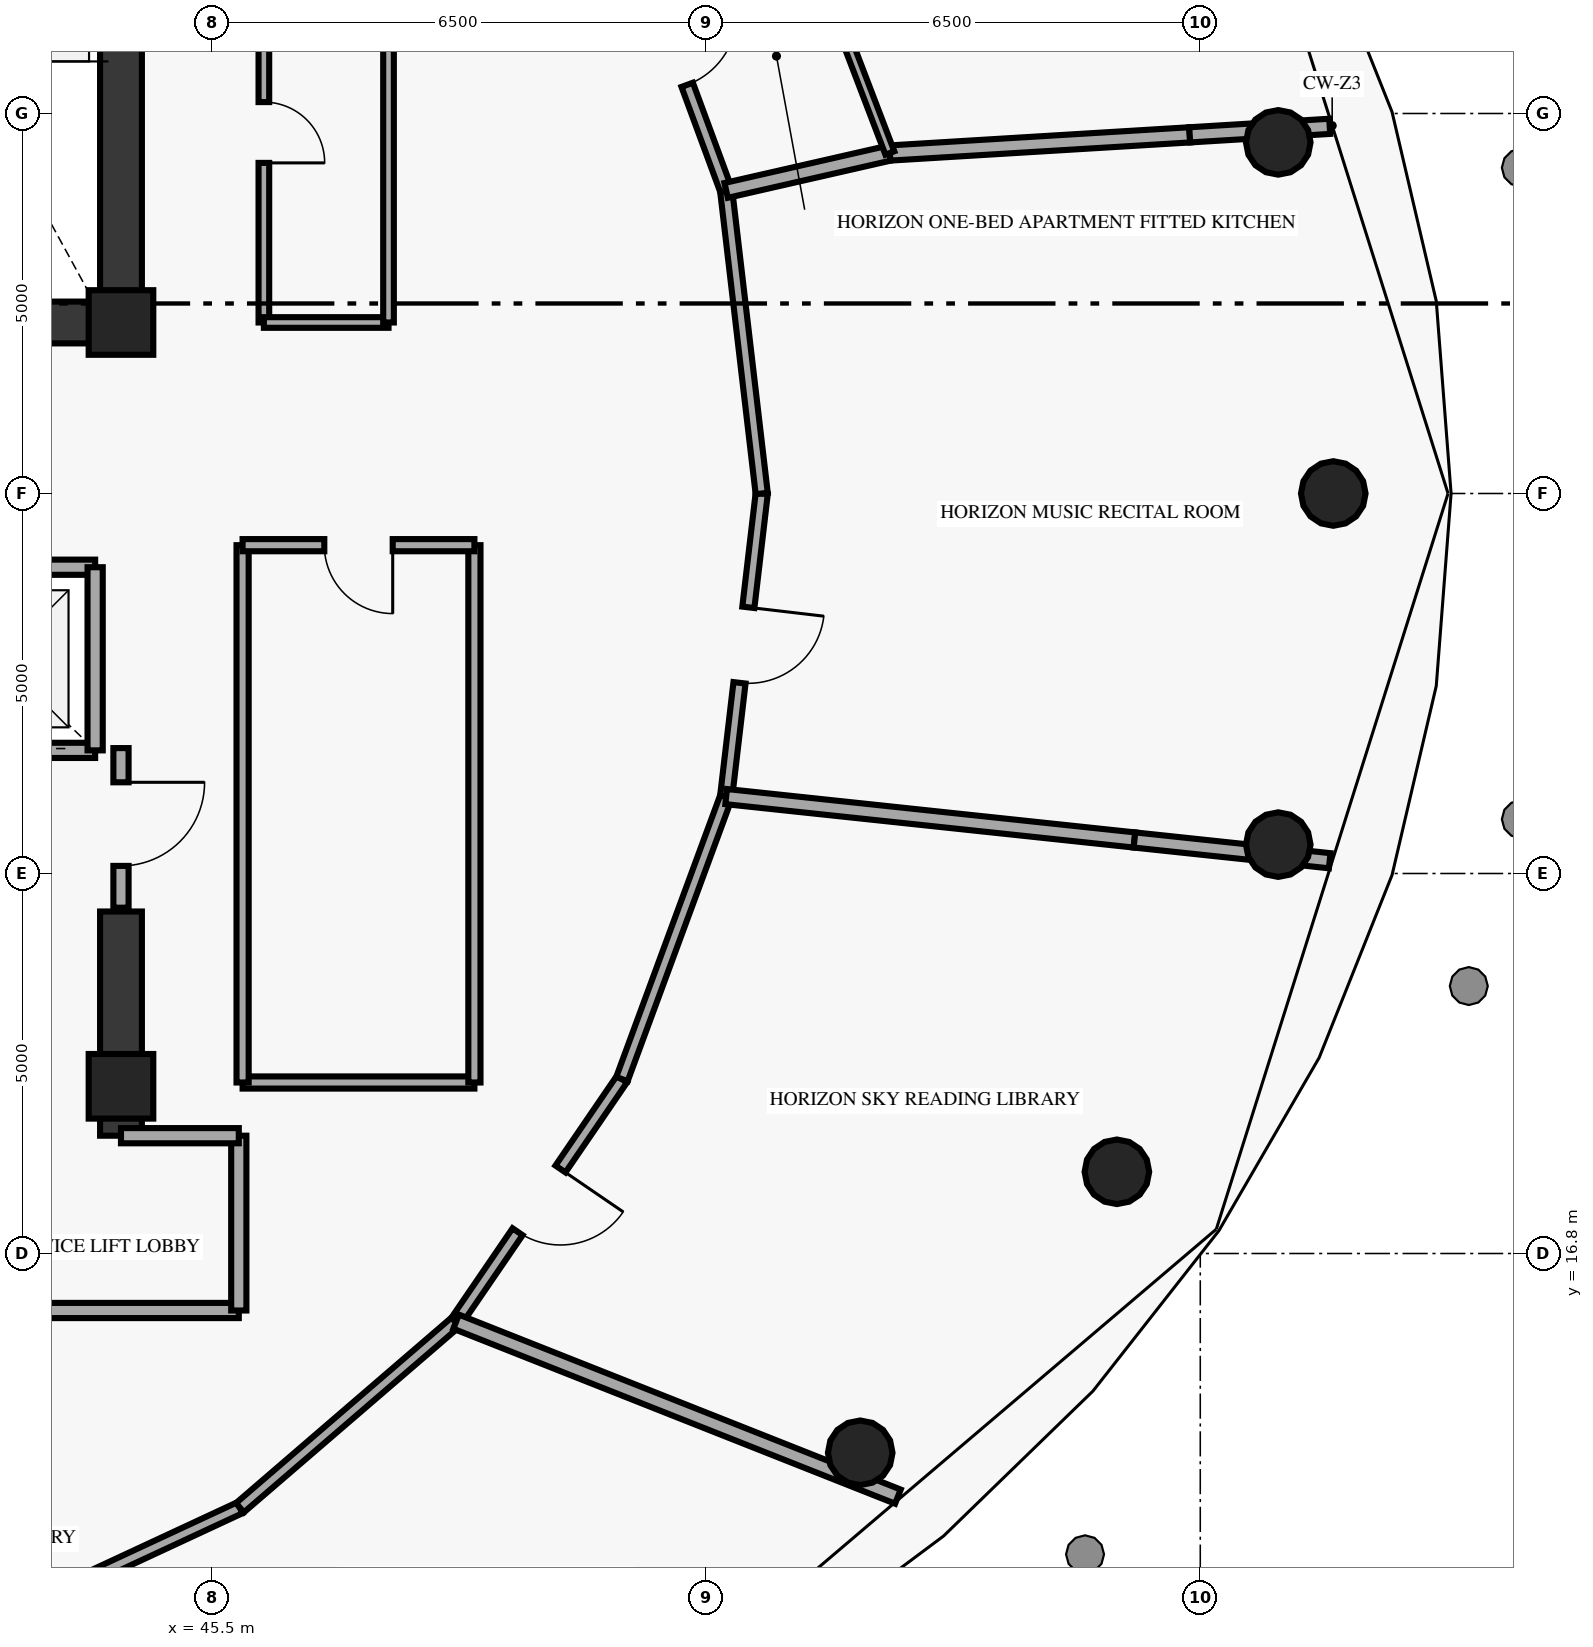
"""IFC4 building model, lengths in metres.
Left out: names, types, materials, properties, quantities, classifications, styles, units other than length and angle.
Written with IfcOpenShell. Run it as: python <this file> out.ifc"""

import sys

from ifc_helpers import new_model, si_unit, direction, frame, frame_2d, origin, origin_2d, place, context, subcontext, project, spatial, rectangle, circle, extrude, element, fill, save


model = new_model("IFC4")
c1 = context("Model", 3, precision=1e-05, world=origin(), true_north=direction((0.0, 1.0)))
c2 = subcontext(c1, "Body", "Model", "MODEL_VIEW")
j1 = project(units=[si_unit("LENGTHUNIT", "METRE"), si_unit("PLANEANGLEUNIT", "RADIAN")], contexts=[c1])
p1 = place(None, origin())
s1 = spatial("IfcSite", under=j1, at=p1, CompositionType="ELEMENT")
p2 = place(p1, origin())
s2 = spatial("IfcBuilding", under=s1, at=p2, CompositionType="ELEMENT")
p3 = place(p2, frame((0.0, 0.0, 251.95)))
s3 = spatial("IfcBuildingStorey", under=s2, at=p3, CompositionType="ELEMENT", Elevation=251.95)
for number, where, z_axis, x_axis in (
    (1, (44.3, 19.0, 0.0), (0.0, 0.0, 1.0), (1.0, 0.0, 0.0)),
    (2, (44.3, 29.05, 0.0), (0.0, 0.0, 1.0), (1.0, 0.0, 0.0)),
):
    element("IfcColumn", number, at=place(p3, frame(where, z_axis=z_axis, x_axis=x_axis)), inside=s3, PredefinedType="PILASTER", context=c2, shape_type="SweptSolid", body=[
        extrude(rectangle(XDim=0.85, YDim=0.85, at=origin_2d()), origin(), (0.0, 0.0, 1.0), 3.39),
    ])
for number, where, z_axis, x_axis in (
    (3, (60.25, 26.8, 0.0), (0.0, 0.0, 1.0), (1.0, 0.0, 0.0)),
    (4, (59.526, 31.42, 0.0), (0.0, 0.0, 1.0), (1.0, 0.0, 0.0)),
    (5, (54.026, 14.178, 0.0), (0.0, 0.0, 1.0), (1.0, 0.0, 0.0)),
    (6, (57.403, 17.875, 0.0), (0.0, 0.0, 1.0), (1.0, 0.0, 0.0)),
    (7, (59.526, 22.18, 0.0), (0.0, 0.0, 1.0), (1.0, 0.0, 0.0)),
):
    element("IfcColumn", number, at=place(p3, frame(where, z_axis=z_axis, x_axis=x_axis)), inside=s3, PredefinedType="COLUMN", context=c2, shape_type="SweptSolid", body=[
        extrude(circle(Radius=0.425, at=origin_2d()), origin(), (0.0, 0.0, 1.0), 3.39),
    ])
p4 = place(p3, frame((44.3, 29.05, 0.0), z_axis=(0.0, 0.0, 1.0), x_axis=(0.0, 1.0, 0.0)))
e8 = element("IfcWall", 8, at=p4, inside=s3, PredefinedType="SHEAR", context=c2, shape_type="SweptSolid", body=[
    extrude(rectangle(XDim=8.35, YDim=0.55, at=frame_2d((4.175, 0.0))), origin(), (0.0, 0.0, 1.0), 3.39),
])
p5 = place(p3, frame((44.3, 18.35, 0.0), z_axis=(0.0, 0.0, 1.0), x_axis=(0.0, 1.0, 0.0)))
e9 = element("IfcWall", 9, at=p5, inside=s3, PredefinedType="SHEAR", context=c2, shape_type="SweptSolid", body=[
    extrude(rectangle(XDim=2.95, YDim=0.55, at=frame_2d((1.475, 0.0))), origin(), (0.0, 0.0, 1.0), 3.39),
])
p6 = place(p3, frame((33.7, 29.05, 0.0), z_axis=(0.0, 0.0, 1.0), x_axis=(1.0, 0.0, 0.0)))
e10 = element("IfcWall", 10, at=p6, inside=s3, PredefinedType="SHEAR", context=c2, shape_type="SweptSolid", body=[
    extrude(rectangle(XDim=10.6, YDim=0.55, at=frame_2d((5.3, 0.0))), origin(), (0.0, 0.0, 1.0), 3.39),
])
p7 = place(p3, frame((41.46, 23.42, 0.0), z_axis=(0.0, 0.0, 1.0), x_axis=(1.0, 0.0, 0.0)))
e11 = element("IfcWall", 11, at=p7, inside=s3, PredefinedType="SOLIDWALL", context=c2, shape_type="SweptSolid", body=[
    extrude(rectangle(XDim=2.5, YDim=0.2, at=frame_2d((1.25, 0.0))), origin(), (0.0, 0.0, 1.0), 3.39),
])
p8 = place(p7, frame((0.7, 0.0, 0.0)))
e12 = element("IfcOpeningElement", 12, at=p8, cuts=e11, PredefinedType="OPENING", context=c2, shape_type="SweptSolid", body=[
    extrude(rectangle(XDim=1.1, YDim=2.15, at=frame_2d((0.55, 1.075))), frame((0.0, 0.11, 0.0), z_axis=(0.0, -1.0, 0.0), x_axis=(1.0, 0.0, 0.0)), (0.0, 0.0, 1.0), 0.22),
])
p9 = place(p3, frame((41.46, 25.83, 0.0), z_axis=(0.0, 0.0, 1.0), x_axis=(1.0, 0.0, 0.0)))
e13 = element("IfcWall", 13, at=p9, inside=s3, PredefinedType="SOLIDWALL", context=c2, shape_type="SweptSolid", body=[
    extrude(rectangle(XDim=2.5, YDim=0.2, at=frame_2d((1.25, 0.0))), origin(), (0.0, 0.0, 1.0), 3.39),
])
p10 = place(p3, frame((43.96, 23.42, 0.0), z_axis=(0.0, 0.0, 1.0), x_axis=(0.0, 1.0, 0.0)))
e14 = element("IfcWall", 14, at=p10, inside=s3, PredefinedType="SOLIDWALL", context=c2, shape_type="SweptSolid", body=[
    extrude(rectangle(XDim=2.41, YDim=0.2, at=frame_2d((1.205, 0.0))), origin(), (0.0, 0.0, 1.0), 3.39),
])
p11 = place(p3, frame((45.9, 19.05, 0.0), z_axis=(0.0, 0.0, 1.0), x_axis=(1.0, 0.0, 0.0)))
e15 = element("IfcWall", 15, at=p11, inside=s3, PredefinedType="PARTITIONING", context=c2, shape_type="SweptSolid", body=[
    extrude(rectangle(XDim=3.05, YDim=0.16, at=frame_2d((1.525, 0.0))), origin(), (0.0, 0.0, 1.0), 3.39),
])
for number, where, z_axis, x_axis in (
    (16, (48.95, 19.05, 0.0), (0.0, 0.0, 1.0), (0.0, 1.0, 0.0)),
    (17, (45.9, 19.05, 0.0), (0.0, 0.0, 1.0), (0.0, 1.0, 0.0)),
):
    element("IfcWall", number, at=place(p3, frame(where, z_axis=z_axis, x_axis=x_axis)), inside=s3, PredefinedType="PARTITIONING", context=c2, shape_type="SweptSolid", body=[
        extrude(rectangle(XDim=7.07, YDim=0.16, at=frame_2d((3.535, 0.0))), origin(), (0.0, 0.0, 1.0), 3.39),
    ])
p12 = place(p3, frame((48.95, 26.12, 0.0), z_axis=(0.0, 0.0, 1.0), x_axis=(-1.0, 0.0, 0.0)))
e18 = element("IfcWall", 18, at=p12, inside=s3, PredefinedType="PARTITIONING", context=c2, shape_type="SweptSolid", body=[
    extrude(rectangle(XDim=3.05, YDim=0.16, at=frame_2d((1.525, 0.0))), origin(), (0.0, 0.0, 1.0), 3.39),
])
p13 = place(p12, frame((1.075, 0.0, 0.0)))
e19 = element("IfcOpeningElement", 19, at=p13, cuts=e18, PredefinedType="OPENING", context=c2, shape_type="SweptSolid", body=[
    extrude(rectangle(XDim=0.9, YDim=2.02, at=frame_2d((0.45, 1.01))), frame((0.0, 0.09, 0.0), z_axis=(0.0, -1.0, 0.0), x_axis=(1.0, 0.0, 0.0)), (0.0, 0.0, 1.0), 0.18),
])
p14 = place(p3, frame((44.3, 21.35, 0.0), z_axis=(0.0, 0.0, 1.0), x_axis=(0.0, 1.0, 0.0)))
e20 = element("IfcWall", 20, at=p14, inside=s3, PredefinedType="SOLIDWALL", context=c2, shape_type="SweptSolid", body=[
    extrude(rectangle(XDim=2.1, YDim=0.2, at=frame_2d((1.05, 0.0))), origin(), (0.0, 0.0, 1.0), 2.775),
])
p15 = place(p14, frame((0.55, 0.0, 0.0)))
e21 = element("IfcOpeningElement", 21, at=p15, cuts=e20, PredefinedType="OPENING", context=c2, shape_type="SweptSolid", body=[
    extrude(rectangle(XDim=1.1, YDim=2.15, at=frame_2d((0.55, 1.075))), frame((0.0, 0.11, 0.0), z_axis=(0.0, -1.0, 0.0), x_axis=(1.0, 0.0, 0.0)), (0.0, 0.0, 1.0), 0.22),
])
p16 = place(p3, frame((41.35, 16.05, 0.0), z_axis=(0.0, 0.0, 1.0), x_axis=(1.0, 0.0, 0.0)))
e22 = element("IfcWall", 22, at=p16, inside=s3, PredefinedType="SOLIDWALL", context=c2, shape_type="SweptSolid", body=[
    extrude(rectangle(XDim=4.5, YDim=0.2, at=frame_2d((2.25, 0.0))), origin(), (0.0, 0.0, 1.0), 3.39),
])
p17 = place(p3, frame((45.85, 16.05, 0.0), z_axis=(0.0, 0.0, 1.0), x_axis=(0.0, 1.0, 0.0)))
e23 = element("IfcWall", 23, at=p17, inside=s3, PredefinedType="SOLIDWALL", context=c2, shape_type="SweptSolid", body=[
    extrude(rectangle(XDim=2.3, YDim=0.2, at=frame_2d((1.15, 0.0))), origin(), (0.0, 0.0, 1.0), 3.39),
])
p18 = place(p3, frame((44.3, 18.35, 0.0), z_axis=(0.0, 0.0, 1.0), x_axis=(1.0, 0.0, 0.0)))
e24 = element("IfcWall", 24, at=p18, inside=s3, PredefinedType="SOLIDWALL", context=c2, shape_type="SweptSolid", body=[
    extrude(rectangle(XDim=1.55, YDim=0.2, at=frame_2d((0.775, 0.0))), origin(), (0.0, 0.0, 1.0), 3.39),
])
p19 = place(p3, frame((46.18, 34.05, 0.0), z_axis=(0.0, 0.0, 1.0), x_axis=(0.0, -1.0, 0.0)))
e25 = element("IfcWall", 25, at=p19, inside=s3, PredefinedType="PARTITIONING", context=c2, shape_type="SweptSolid", body=[
    extrude(rectangle(XDim=5.0, YDim=0.14, at=frame_2d((2.5, 0.0))), origin(), (0.0, 0.0, 1.0), 3.39),
])
p20 = place(p19, frame((2.1, 0.0, 0.0)))
e26 = element("IfcOpeningElement", 26, at=p20, cuts=e25, PredefinedType="OPENING", context=c2, shape_type="SweptSolid", body=[
    extrude(rectangle(XDim=0.8, YDim=2.05, at=frame_2d((0.4, 1.025))), frame((0.0, 0.08, 0.0), z_axis=(0.0, -1.0, 0.0), x_axis=(1.0, 0.0, 0.0)), (0.0, 0.0, 1.0), 0.16),
])
p21 = place(p3, frame((46.18, 29.05, 0.0), z_axis=(0.0, 0.0, 1.0), x_axis=(1.0, 0.0, 0.0)))
e27 = element("IfcWall", 27, at=p21, inside=s3, PredefinedType="PARTITIONING", context=c2, shape_type="SweptSolid", body=[
    extrude(rectangle(XDim=1.64, YDim=0.14, at=frame_2d((0.82, 0.0))), origin(), (0.0, 0.0, 1.0), 3.39),
])
p22 = place(p3, frame((47.82, 29.05, 0.0), z_axis=(0.0, 0.0, 1.0), x_axis=(0.0, 1.0, 0.0)))
e28 = element("IfcWall", 28, at=p22, inside=s3, PredefinedType="PARTITIONING", context=c2, shape_type="SweptSolid", body=[
    extrude(rectangle(XDim=5.0, YDim=0.14, at=frame_2d((2.5, 0.0))), origin(), (0.0, 0.0, 1.0), 3.39),
])
p23 = place(p3, frame((42.554, 11.915, 0.0), z_axis=(0.0, 0.0, 1.0), x_axis=(0.906718733669, 0.421735862851, 0.0)))
e29 = element("IfcWall", 29, at=p23, inside=s3, PredefinedType="PARTITIONING", context=c2, shape_type="SweptSolid", body=[
    extrude(rectangle(XDim=3.652, YDim=0.16, at=frame_2d((1.826, 0.0))), origin(), (0.0, 0.0, 1.0), 3.39),
])
p24 = place(p3, frame((45.865, 13.455, 0.0), z_axis=(0.0, 0.0, 1.0), x_axis=(0.75790014932, 0.652370572344, 0.0)))
e30 = element("IfcWall", 30, at=p24, inside=s3, PredefinedType="PARTITIONING", context=c2, shape_type="SweptSolid", body=[
    extrude(rectangle(XDim=3.752, YDim=0.16, at=frame_2d((1.876, 0.0))), origin(), (0.0, 0.0, 1.0), 3.39),
])
p25 = place(p3, frame((50.891, 19.095, 0.0), z_axis=(0.0, 0.0, 1.0), x_axis=(-0.564366970485, -0.825524029103, 0.0)))
e31 = element("IfcWall", 31, at=p25, inside=s3, PredefinedType="PARTITIONING", context=c2, shape_type="SweptSolid", body=[
    extrude(rectangle(XDim=3.866, YDim=0.16, at=frame_2d((1.933, 0.0))), origin(), (0.0, 0.0, 1.0), 3.39),
])
p26 = place(p25, frame((1.433, 0.0, 0.0)))
e32 = element("IfcOpeningElement", 32, at=p26, cuts=e31, PredefinedType="OPENING", context=c2, shape_type="SweptSolid", body=[
    extrude(rectangle(XDim=1.0, YDim=2.02, at=frame_2d((0.5, 1.01))), frame((0.0, 0.09, 0.0), z_axis=(0.0, -1.0, 0.0), x_axis=(1.0, 0.0, 0.0)), (0.0, 0.0, 1.0), 0.18),
])
p27 = place(p3, frame((50.891, 19.095, 0.0), z_axis=(0.0, 0.0, 1.0), x_axis=(0.346019472199, 0.938227331119, 0.0)))
e33 = element("IfcWall", 33, at=p27, inside=s3, PredefinedType="PARTITIONING", context=c2, shape_type="SweptSolid", body=[
    extrude(rectangle(XDim=3.962, YDim=0.16, at=frame_2d((1.981, 0.0))), origin(), (0.0, 0.0, 1.0), 3.39),
])
p28 = place(p3, frame((52.73, 26.8, 0.0), z_axis=(0.0, 0.0, 1.0), x_axis=(-0.116555498827, -0.993184180146, 0.0)))
e34 = element("IfcWall", 34, at=p28, inside=s3, PredefinedType="PARTITIONING", context=c2, shape_type="SweptSolid", body=[
    extrude(rectangle(XDim=4.015, YDim=0.16, at=frame_2d((2.008, 0.0))), origin(), (0.0, 0.0, 1.0), 3.39),
])
p29 = place(p28, frame((1.508, 0.0, 0.0)))
e35 = element("IfcOpeningElement", 35, at=p29, cuts=e34, PredefinedType="OPENING", context=c2, shape_type="SweptSolid", body=[
    extrude(rectangle(XDim=1.0, YDim=2.02, at=frame_2d((0.5, 1.01))), frame((0.0, 0.09, 0.0), z_axis=(0.0, -1.0, 0.0), x_axis=(1.0, 0.0, 0.0)), (0.0, 0.0, 1.0), 0.18),
])
p30 = place(p3, frame((52.73, 26.8, 0.0), z_axis=(0.0, 0.0, 1.0), x_axis=(-0.116555498827, 0.993184180146, 0.0)))
e36 = element("IfcWall", 36, at=p30, inside=s3, PredefinedType="PARTITIONING", context=c2, shape_type="SweptSolid", body=[
    extrude(rectangle(XDim=4.015, YDim=0.16, at=frame_2d((2.008, 0.0))), origin(), (0.0, 0.0, 1.0), 3.39),
])
p31 = place(p3, frame((50.891, 34.505, 0.0), z_axis=(0.0, 0.0, 1.0), x_axis=(0.346039479237, -0.938219952255, 0.0)))
e37 = element("IfcWall", 37, at=p31, inside=s3, PredefinedType="PARTITIONING", context=c2, shape_type="SweptSolid", body=[
    extrude(rectangle(XDim=3.961, YDim=0.16, at=frame_2d((1.981, 0.0))), origin(), (0.0, 0.0, 1.0), 3.39),
])
p32 = place(p31, frame((1.481, 0.0, 0.0)))
e38 = element("IfcOpeningElement", 38, at=p32, cuts=e37, PredefinedType="OPENING", context=c2, shape_type="SweptSolid", body=[
    extrude(rectangle(XDim=1.0, YDim=2.02, at=frame_2d((0.5, 1.01))), frame((0.0, 0.09, 0.0), z_axis=(0.0, -1.0, 0.0), x_axis=(1.0, 0.0, 0.0)), (0.0, 0.0, 1.0), 0.18),
])
p33 = place(p3, frame((48.709, 15.903, 0.0), z_axis=(0.0, 0.0, 1.0), x_axis=(0.929750366179, -0.368190516703, 0.0)))
e39 = element("IfcWall", 39, at=p33, inside=s3, PredefinedType="PARTITIONING", context=c2, shape_type="SweptSolid", body=[
    extrude(rectangle(XDim=6.252, YDim=0.2, at=frame_2d((3.126, 0.0))), origin(), (0.0, 0.0, 1.0), 3.39),
])
p34 = place(p3, frame((52.262, 22.812, 0.0), z_axis=(0.0, 0.0, 1.0), x_axis=(0.994397709372, -0.105703337676, 0.0)))
e40 = element("IfcWall", 40, at=p34, inside=s3, PredefinedType="PARTITIONING", context=c2, shape_type="SweptSolid", body=[
    extrude(rectangle(XDim=5.402, YDim=0.2, at=frame_2d((2.701, 0.0))), origin(), (0.0, 0.0, 1.0), 3.39),
])
p35 = place(p3, frame((57.634, 22.241, 0.0), z_axis=(0.0, 0.0, 1.0), x_axis=(0.994404857139, -0.105636073849, 0.0)))
e41 = element("IfcWall", 41, at=p35, inside=s3, PredefinedType="PARTITIONING", context=c2, shape_type="SweptSolid", body=[
    extrude(rectangle(XDim=1.884, YDim=0.2, at=frame_2d((0.942, 0.0))), origin(), (0.0, 0.0, 1.0), 2.19),
])
p36 = place(p3, frame((59.507, 22.042, 0.0), z_axis=(0.0, 0.0, 1.0), x_axis=(0.99439593918, -0.105719989323, 0.0)))
e42 = element("IfcWall", 42, at=p36, inside=s3, PredefinedType="PARTITIONING", context=c2, shape_type="SweptSolid", body=[
    extrude(rectangle(XDim=0.7, YDim=0.2, at=frame_2d((0.35, 0.0))), origin(), (0.0, 0.0, 1.0), 3.39),
])
p37 = place(p3, frame((52.262, 30.788, 0.0), z_axis=(0.0, 0.0, 1.0), x_axis=(0.974898951109, 0.222647782668, 0.0)))
e43 = element("IfcWall", 43, at=p37, inside=s3, PredefinedType="PARTITIONING", context=c2, shape_type="SweptSolid", body=[
    extrude(rectangle(XDim=2.209, YDim=0.2, at=frame_2d((1.105, 0.0))), origin(), (0.0, 0.0, 1.0), 2.19),
])
p38 = place(p3, frame((54.416, 31.28, 0.0), z_axis=(0.0, 0.0, 1.0), x_axis=(0.998169739768, 0.06047454516, 0.0)))
e44 = element("IfcWall", 44, at=p38, inside=s3, PredefinedType="PARTITIONING", context=c2, shape_type="SweptSolid", body=[
    extrude(rectangle(XDim=3.952, YDim=0.2, at=frame_2d((1.976, 0.0))), origin(), (0.0, 0.0, 1.0), 3.39),
])
p39 = place(p3, frame((58.361, 31.519, 0.0), z_axis=(0.0, 0.0, 1.0), x_axis=(0.998154184544, 0.060730749033, 0.0)))
e45 = element("IfcWall", 45, at=p39, inside=s3, PredefinedType="PARTITIONING", context=c2, shape_type="SweptSolid", body=[
    extrude(rectangle(XDim=1.845, YDim=0.2, at=frame_2d((0.923, 0.0))), origin(), (0.0, 0.0, 1.0), 2.19),
])
p40 = place(p3, frame((52.822, 35.455, 0.0), z_axis=(0.0, 0.0, 1.0), x_axis=(0.356679026334, -0.934226991782, 0.0)))
e46 = element("IfcWall", 46, at=p40, inside=s3, PredefinedType="PARTITIONING", context=c2, shape_type="SweptSolid", body=[
    extrude(rectangle(XDim=4.469, YDim=0.125, at=frame_2d((2.234, 0.0))), origin(), (0.0, 0.0, 1.0), 3.39),
])
p41 = place(p40, frame((1.784, 0.0, 0.0)))
e47 = element("IfcOpeningElement", 47, at=p41, cuts=e46, PredefinedType="OPENING", context=c2, shape_type="SweptSolid", body=[
    extrude(rectangle(XDim=0.9, YDim=2.02, at=frame_2d((0.45, 1.01))), frame((0.0, 0.073, 0.0), z_axis=(0.0, -1.0, 0.0), x_axis=(1.0, 0.0, 0.0)), (0.0, 0.0, 1.0), 0.145),
])
p42 = place(p13, origin())
e48 = element("IfcDoor", 48, at=p42, inside=s3, OperationType="SINGLE_SWING_LEFT", PredefinedType="DOOR", context=c2, shape_type="SweptSolid", body=[
    extrude(rectangle(XDim=0.9, YDim=2.02, at=frame_2d((0.45, 1.01))), frame((0.0, 0.025, 0.0), z_axis=(0.0, -1.0, 0.0), x_axis=(1.0, 0.0, 0.0)), (0.0, 0.0, 1.0), 0.05),
])
fill(e19, e48)
p43 = place(p15, origin())
e49 = element("IfcDoor", 49, at=p43, inside=s3, OperationType="SINGLE_SWING_RIGHT", PredefinedType="DOOR", context=c2, shape_type="SweptSolid", body=[
    extrude(rectangle(XDim=1.1, YDim=2.15, at=frame_2d((0.55, 1.075))), frame((0.0, 0.025, 0.0), z_axis=(0.0, -1.0, 0.0), x_axis=(1.0, 0.0, 0.0)), (0.0, 0.0, 1.0), 0.05),
])
fill(e21, e49)
p44 = place(p20, origin())
e50 = element("IfcDoor", 50, at=p44, inside=s3, OperationType="SINGLE_SWING_RIGHT", PredefinedType="DOOR", context=c2, shape_type="SweptSolid", body=[
    extrude(rectangle(XDim=0.8, YDim=2.05, at=frame_2d((0.4, 1.025))), frame((0.0, 0.025, 0.0), z_axis=(0.0, -1.0, 0.0), x_axis=(1.0, 0.0, 0.0)), (0.0, 0.0, 1.0), 0.05),
])
fill(e26, e50)
p45 = place(p26, origin())
e51 = element("IfcDoor", 51, at=p45, inside=s3, OperationType="SINGLE_SWING_LEFT", PredefinedType="DOOR", context=c2, shape_type="SweptSolid", body=[
    extrude(rectangle(XDim=1.0, YDim=2.02, at=frame_2d((0.5, 1.01))), frame((0.0, 0.025, 0.0), z_axis=(0.0, -1.0, 0.0), x_axis=(1.0, 0.0, 0.0)), (0.0, 0.0, 1.0), 0.05),
])
fill(e32, e51)
p46 = place(p29, origin())
e52 = element("IfcDoor", 52, at=p46, inside=s3, OperationType="SINGLE_SWING_LEFT", PredefinedType="DOOR", context=c2, shape_type="SweptSolid", body=[
    extrude(rectangle(XDim=1.0, YDim=2.02, at=frame_2d((0.5, 1.01))), frame((0.0, 0.025, 0.0), z_axis=(0.0, -1.0, 0.0), x_axis=(1.0, 0.0, 0.0)), (0.0, 0.0, 1.0), 0.05),
])
fill(e35, e52)
p47 = place(p32, origin())
e53 = element("IfcDoor", 53, at=p47, inside=s3, OperationType="SINGLE_SWING_LEFT", PredefinedType="DOOR", context=c2, shape_type="SweptSolid", body=[
    extrude(rectangle(XDim=1.0, YDim=2.02, at=frame_2d((0.5, 1.01))), frame((0.0, 0.025, 0.0), z_axis=(0.0, -1.0, 0.0), x_axis=(1.0, 0.0, 0.0)), (0.0, 0.0, 1.0), 0.05),
])
fill(e38, e53)
save(model, sys.argv[1])
